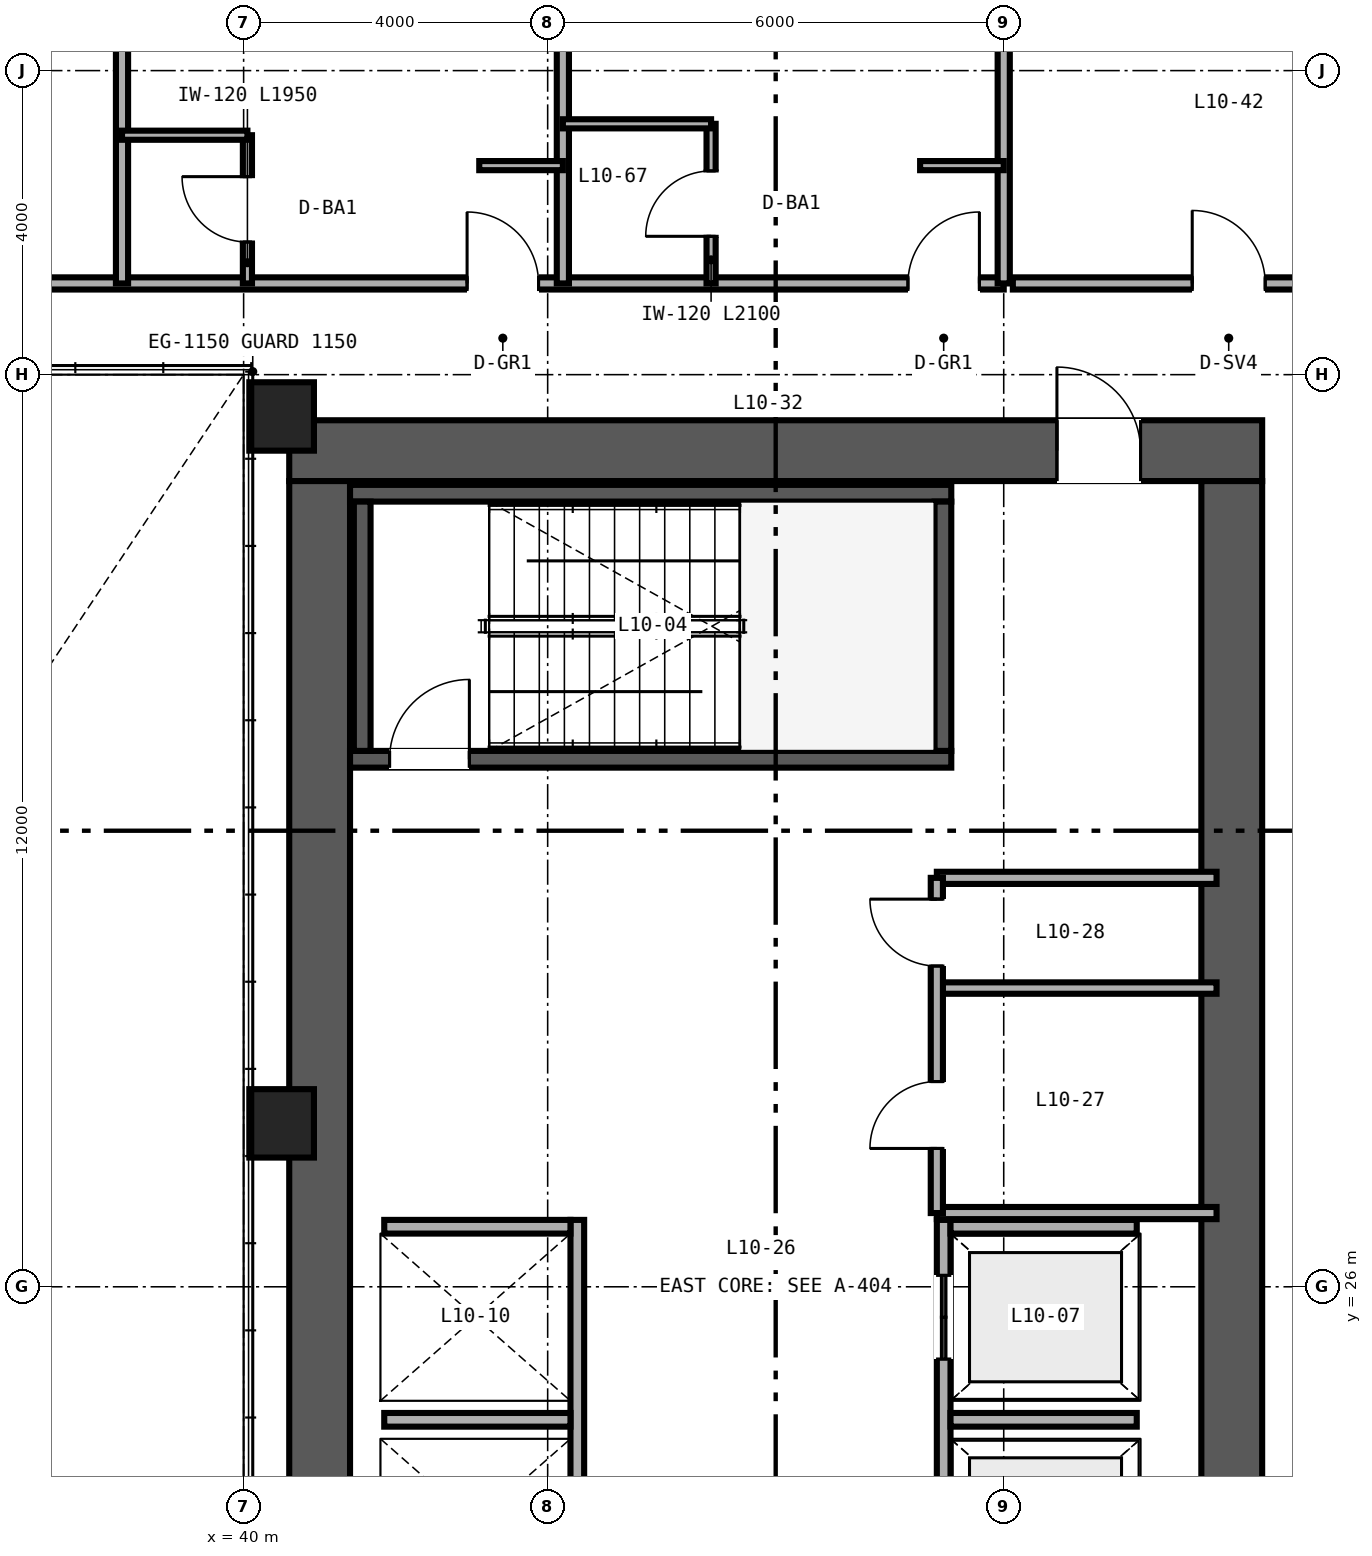
"""IFC4 building model, lengths in metres.
Left out: names, types, materials, properties, quantities, classifications, styles, units other than length and angle.
Written with IfcOpenShell. Run it as: python <this file> out.ifc"""

import sys

from ifc_helpers import new_model, si_unit, direction, frame, frame_2d, origin, origin_2d, place, context, subcontext, project, spatial, rectangle, hollow_rectangle, extrude, source, transform, mapped, element, fill, save


model = new_model("IFC4")
c1 = context("Model", 3, precision=1e-05, world=origin(), true_north=direction((0.0, 1.0)))
c2 = subcontext(c1, "Body", "Model", "MODEL_VIEW")
j1 = project(units=[si_unit("LENGTHUNIT", "METRE"), si_unit("PLANEANGLEUNIT", "RADIAN")], contexts=[c1])
p1 = place(None, origin())
s1 = spatial("IfcSite", under=j1, at=p1, CompositionType="ELEMENT")
p2 = place(p1, origin())
s2 = spatial("IfcBuilding", under=s1, at=p2, CompositionType="ELEMENT")
p3 = place(p2, frame((0.0, 0.0, 45.6)))
s3 = spatial("IfcBuildingStorey", under=s2, at=p3, CompositionType="ELEMENT", Elevation=45.6)
p4 = place(p3, frame((40.6, 37.0, 0.0), z_axis=(0.0, 0.0, 1.0), x_axis=(1.0, 0.0, 0.0)))
e1 = element("IfcWall", 1, at=p4, inside=s3, PredefinedType="SHEAR", context=c2, shape_type="SweptSolid", body=[
    extrude(rectangle(XDim=12.8, YDim=0.8, at=frame_2d((6.4, 0.0))), origin(), (0.0, 0.0, 1.0), 3.35),
])
p5 = place(p4, frame((10.1, 0.0, 0.0)))
e2 = element("IfcOpeningElement", 2, at=p5, cuts=e1, PredefinedType="OPENING", context=c2, shape_type="SweptSolid", body=[
    extrude(rectangle(XDim=1.1, YDim=2.15, at=frame_2d((0.55, 1.075))), frame((0.0, 0.41, 0.0), z_axis=(0.0, -1.0, 0.0), x_axis=(1.0, 0.0, 0.0)), (0.0, 0.0, 1.0), 0.82),
])
for number, where, z_axis, x_axis in (
    (3, (41.0, 15.4, 0.0), (0.0, 0.0, 1.0), (0.0, 1.0, 0.0)),
    (4, (53.0, 15.4, 0.0), (0.0, 0.0, 1.0), (0.0, 1.0, 0.0)),
):
    element("IfcWall", number, at=place(p3, frame(where, z_axis=z_axis, x_axis=x_axis)), inside=s3, PredefinedType="SHEAR", context=c2, shape_type="SweptSolid", body=[
        extrude(rectangle(XDim=21.2, YDim=0.8, at=frame_2d((10.6, 0.0))), origin(), (0.0, 0.0, 1.0), 3.35),
    ])
p6 = place(p3, frame((41.4, 32.94, 0.0), z_axis=(0.0, 0.0, 1.0), x_axis=(1.0, 0.0, 0.0)))
e5 = element("IfcWall", 5, at=p6, inside=s3, PredefinedType="SHEAR", context=c2, shape_type="SweptSolid", body=[
    extrude(rectangle(XDim=7.91, YDim=0.22, at=frame_2d((3.955, 0.0))), origin(), (0.0, 0.0, 1.0), 3.4),
])
p7 = place(p6, frame((0.52, 0.0, 0.0)))
e6 = element("IfcOpeningElement", 6, at=p7, cuts=e5, PredefinedType="OPENING", context=c2, shape_type="SweptSolid", body=[
    extrude(rectangle(XDim=1.05, YDim=2.15, at=frame_2d((0.525, 1.075))), frame((0.0, 0.12, 0.0), z_axis=(0.0, -1.0, 0.0), x_axis=(1.0, 0.0, 0.0)), (0.0, 0.0, 1.0), 0.24),
])
p8 = place(p3, frame((41.4, 36.44, 0.0), z_axis=(0.0, 0.0, 1.0), x_axis=(1.0, 0.0, 0.0)))
e7 = element("IfcWall", 7, at=p8, inside=s3, PredefinedType="SHEAR", context=c2, shape_type="SweptSolid", body=[
    extrude(rectangle(XDim=7.91, YDim=0.22, at=frame_2d((3.955, 0.0))), origin(), (0.0, 0.0, 1.0), 3.4),
])
for number, where, z_axis, x_axis in (
    (8, (41.56, 33.05, 0.0), (0.0, 0.0, 1.0), (0.0, 1.0, 0.0)),
    (9, (49.2, 33.05, 0.0), (0.0, 0.0, 1.0), (0.0, 1.0, 0.0)),
):
    element("IfcWall", number, at=place(p3, frame(where, z_axis=z_axis, x_axis=x_axis)), inside=s3, PredefinedType="SHEAR", context=c2, shape_type="SweptSolid", body=[
        extrude(rectangle(XDim=3.28, YDim=0.22, at=frame_2d((1.64, 0.0))), origin(), (0.0, 0.0, 1.0), 3.4),
    ])
m1 = source(origin(), c2, "Body", "SweptSolid", [
    extrude(hollow_rectangle(XDim=0.85, YDim=0.9, WallThickness=0.04, at=origin_2d()), origin(), (0.0, 0.0, 1.0), 3.35),
])
for number, where, z_axis, x_axis in (
    (10, (40.5, 28.15, 0.0), (0.0, 0.0, 1.0), (1.0, 0.0, 0.0)),
    (11, (40.5, 37.45, 0.0), (0.0, 0.0, 1.0), (1.0, 0.0, 0.0)),
):
    element("IfcColumn", number, at=place(p3, frame(where, z_axis=z_axis, x_axis=x_axis)), inside=s3, PredefinedType="COLUMN", context=c2, shape_type="MappedRepresentation", body=[
        mapped(m1, transform((0.0, 0.0, 0.0), scale=1.0)),
    ])
p9 = place(p3, frame((49.21, 18.92, 0.0), z_axis=(0.0, 0.0, 1.0), x_axis=(0.0, 1.0, 0.0)))
e12 = element("IfcWall", 12, at=p9, inside=s3, PredefinedType="SOLIDWALL", context=c2, shape_type="SweptSolid", body=[
    extrude(rectangle(XDim=7.96, YDim=0.18, at=frame_2d((3.98, 0.0))), origin(), (0.0, 0.0, 1.0), 3.35),
])
p10 = place(p9, frame((0.73, 0.0, 0.0)))
e13 = element("IfcOpeningElement", 13, at=p10, cuts=e12, PredefinedType="OPENING", context=c2, shape_type="SweptSolid", body=[
    extrude(rectangle(XDim=1.1, YDim=2.2, at=frame_2d((0.55, 1.1))), frame((0.0, 0.1, 0.0), z_axis=(0.0, -1.0, 0.0), x_axis=(1.0, 0.0, 0.0)), (0.0, 0.0, 1.0), 0.2),
])
p11 = place(p9, frame((3.43, 0.0, 0.0)))
e14 = element("IfcOpeningElement", 14, at=p11, cuts=e12, PredefinedType="OPENING", context=c2, shape_type="SweptSolid", body=[
    extrude(rectangle(XDim=1.1, YDim=2.2, at=frame_2d((0.55, 1.1))), frame((0.0, 0.1, 0.0), z_axis=(0.0, -1.0, 0.0), x_axis=(1.0, 0.0, 0.0)), (0.0, 0.0, 1.0), 0.2),
])
p12 = place(p9, frame((6.13, 0.0, 0.0)))
e15 = element("IfcOpeningElement", 15, at=p12, cuts=e12, PredefinedType="OPENING", context=c2, shape_type="SweptSolid", body=[
    extrude(rectangle(XDim=1.1, YDim=2.2, at=frame_2d((0.55, 1.1))), frame((0.0, 0.1, 0.0), z_axis=(0.0, -1.0, 0.0), x_axis=(1.0, 0.0, 0.0)), (0.0, 0.0, 1.0), 0.2),
])
for number, where, z_axis, x_axis in (
    (16, (49.3, 26.79, 0.0), (0.0, 0.0, 1.0), (1.0, 0.0, 0.0)),
    (17, (49.3, 24.25, 0.0), (0.0, 0.0, 1.0), (1.0, 0.0, 0.0)),
):
    element("IfcWall", number, at=place(p3, frame(where, z_axis=z_axis, x_axis=x_axis)), inside=s3, PredefinedType="SOLIDWALL", context=c2, shape_type="SweptSolid", body=[
        extrude(rectangle(XDim=2.45, YDim=0.18, at=frame_2d((1.225, 0.0))), origin(), (0.0, 0.0, 1.0), 3.35),
    ])
p13 = place(p3, frame((44.39, 18.92, 0.0), z_axis=(0.0, 0.0, 1.0), x_axis=(0.0, 1.0, 0.0)))
e18 = element("IfcWall", 18, at=p13, inside=s3, PredefinedType="SOLIDWALL", context=c2, shape_type="SweptSolid", body=[
    extrude(rectangle(XDim=7.96, YDim=0.18, at=frame_2d((3.98, 0.0))), origin(), (0.0, 0.0, 1.0), 3.35),
])
for number, where, z_axis, x_axis in (
    (19, (41.85, 26.79, 0.0), (0.0, 0.0, 1.0), (1.0, 0.0, 0.0)),
    (20, (41.85, 24.25, 0.0), (0.0, 0.0, 1.0), (1.0, 0.0, 0.0)),
):
    element("IfcWall", number, at=place(p3, frame(where, z_axis=z_axis, x_axis=x_axis)), inside=s3, PredefinedType="SOLIDWALL", context=c2, shape_type="SweptSolid", body=[
        extrude(rectangle(XDim=2.45, YDim=0.18, at=frame_2d((1.225, 0.0))), origin(), (0.0, 0.0, 1.0), 3.35),
    ])
p14 = place(p3, frame((49.12, 26.97, 0.0), z_axis=(0.0, 0.0, 1.0), x_axis=(1.0, 0.0, 0.0)))
e21 = element("IfcWall", 21, at=p14, inside=s3, PredefinedType="PARTITIONING", context=c2, shape_type="SweptSolid", body=[
    extrude(rectangle(XDim=3.68, YDim=0.16, at=frame_2d((1.84, 0.0))), origin(), (0.0, 0.0, 1.0), 3.35),
])
p15 = place(p3, frame((49.12, 31.38, 0.0), z_axis=(0.0, 0.0, 1.0), x_axis=(1.0, 0.0, 0.0)))
e22 = element("IfcWall", 22, at=p15, inside=s3, PredefinedType="PARTITIONING", context=c2, shape_type="SweptSolid", body=[
    extrude(rectangle(XDim=3.68, YDim=0.16, at=frame_2d((1.84, 0.0))), origin(), (0.0, 0.0, 1.0), 2.36),
])
p16 = place(p3, frame((49.12, 29.93, 0.0), z_axis=(0.0, 0.0, 1.0), x_axis=(1.0, 0.0, 0.0)))
e23 = element("IfcWall", 23, at=p16, inside=s3, PredefinedType="PARTITIONING", context=c2, shape_type="SweptSolid", body=[
    extrude(rectangle(XDim=3.68, YDim=0.15, at=frame_2d((1.84, 0.0))), origin(), (0.0, 0.0, 1.0), 3.35),
])
p17 = place(p3, frame((49.12, 26.97, 0.0), z_axis=(0.0, 0.0, 1.0), x_axis=(0.0, 1.0, 0.0)))
e24 = element("IfcWall", 24, at=p17, inside=s3, PredefinedType="PARTITIONING", context=c2, shape_type="SweptSolid", body=[
    extrude(rectangle(XDim=4.41, YDim=0.16, at=frame_2d((2.205, 0.0))), origin(), (0.0, 0.0, 1.0), 2.36),
])
p18 = place(p17, frame((0.85, 0.0, 0.0)))
e25 = element("IfcOpeningElement", 25, at=p18, cuts=e24, PredefinedType="OPENING", context=c2, shape_type="SweptSolid", body=[
    extrude(rectangle(XDim=0.88, YDim=2.15, at=frame_2d((0.44, 1.075))), frame((0.0, 0.09, 0.0), z_axis=(0.0, -1.0, 0.0), x_axis=(1.0, 0.0, 0.0)), (0.0, 0.0, 1.0), 0.18),
])
p19 = place(p17, frame((3.25, 0.0, 0.0)))
e26 = element("IfcOpeningElement", 26, at=p19, cuts=e24, PredefinedType="OPENING", context=c2, shape_type="SweptSolid", body=[
    extrude(rectangle(XDim=0.88, YDim=2.15, at=frame_2d((0.44, 1.075))), frame((0.0, 0.09, 0.0), z_axis=(0.0, -1.0, 0.0), x_axis=(1.0, 0.0, 0.0)), (0.0, 0.0, 1.0), 0.18),
])
p20 = place(p3, frame((50.12, 39.2, 0.0), z_axis=(0.0, 0.0, 1.0), x_axis=(1.0, 0.0, 0.0)))
e27 = element("IfcWall", 27, at=p20, inside=s3, PredefinedType="PARTITIONING", context=c2, shape_type="SweptSolid", body=[
    extrude(rectangle(XDim=5.68, YDim=0.16, at=frame_2d((2.84, 0.0))), origin(), (0.0, 0.0, 1.0), 3.35),
])
p21 = place(p20, frame((2.36, 0.0, 0.0)))
e28 = element("IfcOpeningElement", 28, at=p21, cuts=e27, PredefinedType="OPENING", context=c2, shape_type="SweptSolid", body=[
    extrude(rectangle(XDim=0.96, YDim=2.15, at=frame_2d((0.48, 1.075))), frame((0.0, 0.09, 0.0), z_axis=(0.0, -1.0, 0.0), x_axis=(1.0, 0.0, 0.0)), (0.0, 0.0, 1.0), 0.18),
])
p22 = place(p3, frame((14.0, 39.2, 0.0), z_axis=(0.0, 0.0, 1.0), x_axis=(1.0, 0.0, 0.0)))
e29 = element("IfcWall", 29, at=p22, inside=s3, PredefinedType="PARTITIONING", context=c2, shape_type="SweptSolid", body=[
    extrude(rectangle(XDim=36.0, YDim=0.16, at=frame_2d((18.0, 0.0))), origin(), (0.0, 0.0, 1.0), 2.571),
])
p23 = place(p22, frame((4.54, 0.0, 0.0)))
e30 = element("IfcOpeningElement", 30, at=p23, cuts=e29, PredefinedType="OPENING", context=c2, shape_type="SweptSolid", body=[
    extrude(rectangle(XDim=0.94, YDim=2.15, at=frame_2d((0.47, 1.075))), frame((0.0, 0.09, 0.0), z_axis=(0.0, -1.0, 0.0), x_axis=(1.0, 0.0, 0.0)), (0.0, 0.0, 1.0), 0.18),
])
p24 = place(p22, frame((10.29, 0.0, 0.0)))
e31 = element("IfcOpeningElement", 31, at=p24, cuts=e29, PredefinedType="OPENING", context=c2, shape_type="SweptSolid", body=[
    extrude(rectangle(XDim=0.94, YDim=2.15, at=frame_2d((0.47, 1.075))), frame((0.0, 0.09, 0.0), z_axis=(0.0, -1.0, 0.0), x_axis=(1.0, 0.0, 0.0)), (0.0, 0.0, 1.0), 0.18),
])
p25 = place(p22, frame((16.54, 0.0, 0.0)))
e32 = element("IfcOpeningElement", 32, at=p25, cuts=e29, PredefinedType="OPENING", context=c2, shape_type="SweptSolid", body=[
    extrude(rectangle(XDim=0.94, YDim=2.15, at=frame_2d((0.47, 1.075))), frame((0.0, 0.09, 0.0), z_axis=(0.0, -1.0, 0.0), x_axis=(1.0, 0.0, 0.0)), (0.0, 0.0, 1.0), 0.18),
])
p26 = place(p22, frame((20.62, 0.0, 0.0)))
e33 = element("IfcOpeningElement", 33, at=p26, cuts=e29, PredefinedType="OPENING", context=c2, shape_type="SweptSolid", body=[
    extrude(rectangle(XDim=0.96, YDim=2.15, at=frame_2d((0.48, 1.075))), frame((0.0, 0.09, 0.0), z_axis=(0.0, -1.0, 0.0), x_axis=(1.0, 0.0, 0.0)), (0.0, 0.0, 1.0), 0.18),
])
p27 = place(p22, frame((28.94, 0.0, 0.0)))
e34 = element("IfcOpeningElement", 34, at=p27, cuts=e29, PredefinedType="OPENING", context=c2, shape_type="SweptSolid", body=[
    extrude(rectangle(XDim=0.94, YDim=2.15, at=frame_2d((0.47, 1.075))), frame((0.0, 0.09, 0.0), z_axis=(0.0, -1.0, 0.0), x_axis=(1.0, 0.0, 0.0)), (0.0, 0.0, 1.0), 0.18),
])
p28 = place(p22, frame((34.74, 0.0, 0.0)))
e35 = element("IfcOpeningElement", 35, at=p28, cuts=e29, PredefinedType="OPENING", context=c2, shape_type="SweptSolid", body=[
    extrude(rectangle(XDim=0.94, YDim=2.15, at=frame_2d((0.47, 1.075))), frame((0.0, 0.09, 0.0), z_axis=(0.0, -1.0, 0.0), x_axis=(1.0, 0.0, 0.0)), (0.0, 0.0, 1.0), 0.18),
])
p29 = place(p3, frame((50.0, 39.2, 0.0), z_axis=(0.0, 0.0, 1.0), x_axis=(0.0, 1.0, 0.0)))
e36 = element("IfcWall", 36, at=p29, inside=s3, PredefinedType="PARTITIONING", context=c2, shape_type="SweptSolid", body=[
    extrude(rectangle(XDim=10.44, YDim=0.16, at=frame_2d((5.22, 0.0))), origin(), (0.0, 0.0, 1.0), 2.657),
])
p30 = place(p3, frame((38.4, 39.2, 0.0), z_axis=(0.0, 0.0, 1.0), x_axis=(0.0, 1.0, 0.0)))
e37 = element("IfcWall", 37, at=p30, inside=s3, PredefinedType="PARTITIONING", context=c2, shape_type="SweptSolid", body=[
    extrude(rectangle(XDim=10.44, YDim=0.16, at=frame_2d((5.22, 0.0))), origin(), (0.0, 0.0, 1.0), 2.423),
])
p31 = place(p3, frame((44.2, 39.2, 0.0), z_axis=(0.0, 0.0, 1.0), x_axis=(0.0, 1.0, 0.0)))
e38 = element("IfcWall", 38, at=p31, inside=s3, PredefinedType="PARTITIONING", context=c2, shape_type="SweptSolid", body=[
    extrude(rectangle(XDim=10.44, YDim=0.16, at=frame_2d((5.22, 0.0))), origin(), (0.0, 0.0, 1.0), 2.657),
])
p32 = place(p3, frame((40.05, 39.2, 0.0), z_axis=(0.0, 0.0, 1.0), x_axis=(0.0, 1.0, 0.0)))
e39 = element("IfcWall", 39, at=p32, inside=s3, PredefinedType="PARTITIONING", context=c2, shape_type="SweptSolid", body=[
    extrude(rectangle(XDim=1.95, YDim=0.12, at=frame_2d((0.975, 0.0))), origin(), (0.0, 0.0, 1.0), 3.35),
])
p33 = place(p32, frame((0.545, 0.0, 0.0)))
e40 = element("IfcOpeningElement", 40, at=p33, cuts=e39, PredefinedType="OPENING", context=c2, shape_type="SweptSolid", body=[
    extrude(rectangle(XDim=0.86, YDim=2.1, at=frame_2d((0.43, 1.05))), frame((0.0, 0.07, 0.0), z_axis=(0.0, -1.0, 0.0), x_axis=(1.0, 0.0, 0.0)), (0.0, 0.0, 1.0), 0.14),
])
p34 = place(p3, frame((38.4, 41.15, 0.0), z_axis=(0.0, 0.0, 1.0), x_axis=(1.0, 0.0, 0.0)))
e41 = element("IfcWall", 41, at=p34, inside=s3, PredefinedType="PARTITIONING", context=c2, shape_type="SweptSolid", body=[
    extrude(rectangle(XDim=1.65, YDim=0.12, at=frame_2d((0.825, 0.0))), origin(), (0.0, 0.0, 1.0), 3.35),
])
p35 = place(p3, frame((43.1, 40.75, 0.0), z_axis=(0.0, 0.0, 1.0), x_axis=(1.0, 0.0, 0.0)))
e42 = element("IfcWall", 42, at=p35, inside=s3, PredefinedType="PARTITIONING", context=c2, shape_type="SweptSolid", body=[
    extrude(rectangle(XDim=1.1, YDim=0.12, at=frame_2d((0.55, 0.0))), origin(), (0.0, 0.0, 1.0), 3.35),
])
p36 = place(p3, frame((46.15, 39.2, 0.0), z_axis=(0.0, 0.0, 1.0), x_axis=(0.0, 1.0, 0.0)))
e43 = element("IfcWall", 43, at=p36, inside=s3, PredefinedType="PARTITIONING", context=c2, shape_type="SweptSolid", body=[
    extrude(rectangle(XDim=2.1, YDim=0.12, at=frame_2d((1.05, 0.0))), origin(), (0.0, 0.0, 1.0), 3.35),
])
p37 = place(p36, frame((0.62, 0.0, 0.0)))
e44 = element("IfcOpeningElement", 44, at=p37, cuts=e43, PredefinedType="OPENING", context=c2, shape_type="SweptSolid", body=[
    extrude(rectangle(XDim=0.86, YDim=2.1, at=frame_2d((0.43, 1.05))), frame((0.0, 0.07, 0.0), z_axis=(0.0, -1.0, 0.0), x_axis=(1.0, 0.0, 0.0)), (0.0, 0.0, 1.0), 0.14),
])
p38 = place(p3, frame((44.2, 41.3, 0.0), z_axis=(0.0, 0.0, 1.0), x_axis=(1.0, 0.0, 0.0)))
e45 = element("IfcWall", 45, at=p38, inside=s3, PredefinedType="PARTITIONING", context=c2, shape_type="SweptSolid", body=[
    extrude(rectangle(XDim=1.95, YDim=0.12, at=frame_2d((0.975, 0.0))), origin(), (0.0, 0.0, 1.0), 3.35),
])
p39 = place(p3, frame((48.9, 40.75, 0.0), z_axis=(0.0, 0.0, 1.0), x_axis=(1.0, 0.0, 0.0)))
e46 = element("IfcWall", 46, at=p39, inside=s3, PredefinedType="PARTITIONING", context=c2, shape_type="SweptSolid", body=[
    extrude(rectangle(XDim=1.1, YDim=0.12, at=frame_2d((0.55, 0.0))), origin(), (0.0, 0.0, 1.0), 3.35),
])
m2 = source(origin(), c2, "Body", "SweptSolid", [
    extrude(rectangle(XDim=1.05, YDim=2.15, at=frame_2d((0.525, 1.075))), frame((0.0, 0.025, 0.0), z_axis=(0.0, -1.0, 0.0), x_axis=(1.0, 0.0, 0.0)), (0.0, 0.0, 1.0), 0.05),
])
p40 = place(p7, origin())
e47 = element("IfcDoor", 47, at=p40, inside=s3, OperationType="SINGLE_SWING_RIGHT", PredefinedType="DOOR", context=c2, shape_type="MappedRepresentation", body=[
    mapped(m2, transform((0.0, 0.0, 0.0), scale=1.0)),
])
fill(e6, e47)
m3 = source(origin(), c2, "Body", "SweptSolid", [
    extrude(rectangle(XDim=1.1, YDim=2.2, at=frame_2d((0.55, 1.1))), frame((0.0, 0.025, 0.0), z_axis=(0.0, -1.0, 0.0), x_axis=(1.0, 0.0, 0.0)), (0.0, 0.0, 1.0), 0.05),
])
p41 = place(p12, origin())
e48 = element("IfcDoor", 48, at=p41, inside=s3, OperationType="DOUBLE_DOOR_SLIDING", PredefinedType="DOOR", context=c2, shape_type="MappedRepresentation", body=[
    mapped(m3, transform((0.0, 0.0, 0.0), scale=1.0)),
])
fill(e15, e48)
m4 = source(origin(), c2, "Body", "SweptSolid", [
    extrude(rectangle(XDim=1.1, YDim=2.15, at=frame_2d((0.55, 1.075))), frame((0.0, 0.025, 0.0), z_axis=(0.0, -1.0, 0.0), x_axis=(1.0, 0.0, 0.0)), (0.0, 0.0, 1.0), 0.05),
])
p42 = place(p5, origin())
e49 = element("IfcDoor", 49, at=p42, inside=s3, OperationType="SINGLE_SWING_LEFT", PredefinedType="DOOR", context=c2, shape_type="MappedRepresentation", body=[
    mapped(m4, transform((0.0, 0.0, 0.0), scale=1.0)),
])
fill(e2, e49)
m5 = source(origin(), c2, "Body", "SweptSolid", [
    extrude(rectangle(XDim=0.88, YDim=2.15, at=frame_2d((0.44, 1.075))), frame((0.0, 0.025, 0.0), z_axis=(0.0, -1.0, 0.0), x_axis=(1.0, 0.0, 0.0)), (0.0, 0.0, 1.0), 0.05),
])
p43 = place(p18, origin())
e50 = element("IfcDoor", 50, at=p43, inside=s3, OperationType="SINGLE_SWING_LEFT", PredefinedType="DOOR", context=c2, shape_type="MappedRepresentation", body=[
    mapped(m5, transform((0.0, 0.0, 0.0), scale=1.0)),
])
fill(e25, e50)
p44 = place(p19, origin())
e51 = element("IfcDoor", 51, at=p44, inside=s3, OperationType="SINGLE_SWING_RIGHT", PredefinedType="DOOR", context=c2, shape_type="MappedRepresentation", body=[
    mapped(m5, transform((0.0, 0.0, 0.0), scale=1.0)),
])
fill(e26, e51)
m6 = source(origin(), c2, "Body", "SweptSolid", [
    extrude(rectangle(XDim=0.96, YDim=2.15, at=frame_2d((0.48, 1.075))), frame((0.0, 0.025, 0.0), z_axis=(0.0, -1.0, 0.0), x_axis=(1.0, 0.0, 0.0)), (0.0, 0.0, 1.0), 0.05),
])
p45 = place(p21, origin())
e52 = element("IfcDoor", 52, at=p45, inside=s3, OperationType="SINGLE_SWING_LEFT", PredefinedType="DOOR", context=c2, shape_type="MappedRepresentation", body=[
    mapped(m6, transform((0.0, 0.0, 0.0), scale=1.0)),
])
fill(e28, e52)
m7 = source(origin(), c2, "Body", "SweptSolid", [
    extrude(rectangle(XDim=0.86, YDim=2.1, at=frame_2d((0.43, 1.05))), frame((0.0, 0.025, 0.0), z_axis=(0.0, -1.0, 0.0), x_axis=(1.0, 0.0, 0.0)), (0.0, 0.0, 1.0), 0.05),
])
p46 = place(p33, origin())
e53 = element("IfcDoor", 53, at=p46, inside=s3, OperationType="SINGLE_SWING_RIGHT", PredefinedType="DOOR", context=c2, shape_type="MappedRepresentation", body=[
    mapped(m7, transform((0.0, 0.0, 0.0), scale=1.0)),
])
fill(e40, e53)
p47 = place(p37, origin())
e54 = element("IfcDoor", 54, at=p47, inside=s3, OperationType="SINGLE_SWING_LEFT", PredefinedType="DOOR", context=c2, shape_type="MappedRepresentation", body=[
    mapped(m7, transform((0.0, 0.0, 0.0), scale=1.0)),
])
fill(e44, e54)
m8 = source(origin(), c2, "Body", "SweptSolid", [
    extrude(rectangle(XDim=0.94, YDim=2.15, at=frame_2d((0.47, 1.075))), frame((0.0, 0.025, 0.0), z_axis=(0.0, -1.0, 0.0), x_axis=(1.0, 0.0, 0.0)), (0.0, 0.0, 1.0), 0.05),
])
p48 = place(p27, origin())
e55 = element("IfcDoor", 55, at=p48, inside=s3, OperationType="SINGLE_SWING_LEFT", PredefinedType="DOOR", context=c2, shape_type="MappedRepresentation", body=[
    mapped(m8, transform((0.0, 0.0, 0.0), scale=1.0)),
])
fill(e34, e55)
p49 = place(p28, origin())
e56 = element("IfcDoor", 56, at=p49, inside=s3, OperationType="SINGLE_SWING_RIGHT", PredefinedType="DOOR", context=c2, shape_type="MappedRepresentation", body=[
    mapped(m8, transform((0.0, 0.0, 0.0), scale=1.0)),
])
fill(e35, e56)
save(model, sys.argv[1])
